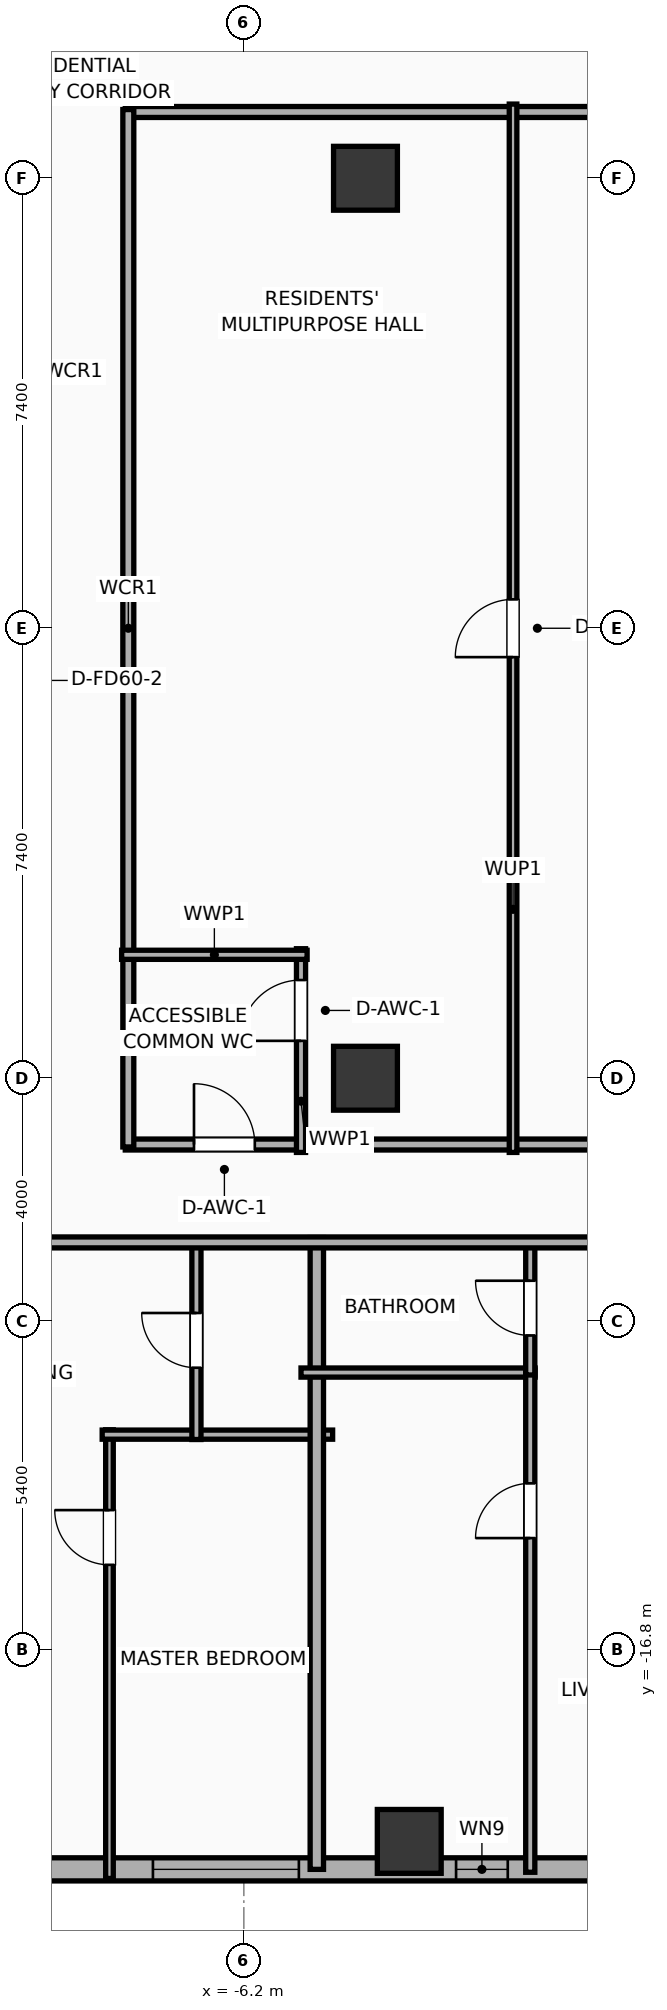
"""IFC4 building model, lengths in metres.
Left out: names, types, materials, properties, quantities, classifications, styles, units other than length and angle.
Written with IfcOpenShell. Run it as: python <this file> out.ifc"""

import sys

from ifc_helpers import new_model, si_unit, direction, frame, frame_2d, origin, origin_2d, place, context, subcontext, project, spatial, rectangle, hollow_rectangle, extrude, element, fill, save


model = new_model("IFC4")
c1 = context("Model", 3, precision=1e-05, world=origin(), true_north=direction((0.0, 1.0)))
c2 = subcontext(c1, "Body", "Model", "MODEL_VIEW")
j1 = project(units=[si_unit("LENGTHUNIT", "METRE"), si_unit("PLANEANGLEUNIT", "RADIAN")], contexts=[c1])
p1 = place(None, origin())
s1 = spatial("IfcSite", under=j1, at=p1, CompositionType="ELEMENT")
p2 = place(p1, origin())
s2 = spatial("IfcBuilding", under=s1, at=p2, CompositionType="ELEMENT")
p3 = place(p2, frame((0.0, 0.0, 105.3)))
s3 = spatial("IfcBuildingStorey", under=s2, at=p3, CompositionType="ELEMENT", Elevation=105.3)
for number, where, z_axis, x_axis in (
    (1, (-4.2, -7.4, 0.0), (0.0, 0.0, 1.0), (1.0, 0.0, 0.0)),
    (2, (-4.2, 7.4, 0.0), (0.0, 0.0, 1.0), (1.0, 0.0, 0.0)),
):
    element("IfcColumn", number, at=place(p3, frame(where, z_axis=z_axis, x_axis=x_axis)), inside=s3, PredefinedType="COLUMN", context=c2, shape_type="SweptSolid", body=[
        extrude(rectangle(XDim=1.05, YDim=1.05, at=origin_2d()), origin(), (0.0, 0.0, 1.0), 3.9),
    ])
p4 = place(p3, frame((-3.48, -19.95, 0.0), z_axis=(0.0, 0.0, 1.0), x_axis=(1.0, 0.0, 0.0)))
e3 = element("IfcColumn", 3, at=p4, inside=s3, PredefinedType="COLUMN", context=c2, shape_type="SweptSolid", body=[
    extrude(hollow_rectangle(XDim=1.05, YDim=1.05, WallThickness=0.036, at=origin_2d()), origin(), (0.0, 0.0, 1.0), 3.9),
])
p5 = place(p3, frame((29.381, -20.41, 0.0), z_axis=(0.0, 0.0, 1.0), x_axis=(-1.0, 0.0, 0.0)))
e4 = element("IfcWall", 4, at=p5, inside=s3, PredefinedType="ELEMENTEDWALL", context=c2, shape_type="SweptSolid", body=[
    extrude(rectangle(XDim=54.763, YDim=0.38, at=frame_2d((27.381, 0.0))), origin(), (0.0, 0.0, 1.0), 3.65),
])
p6 = place(p5, frame((6.495, 0.0, 0.75)))
e5 = element("IfcOpeningElement", 5, at=p6, cuts=e4, PredefinedType="OPENING", context=c2, shape_type="SweptSolid", body=[
    extrude(rectangle(XDim=2.4, YDim=2.1, at=frame_2d((1.2, 1.05))), frame((0.0, 0.2, 0.0), z_axis=(0.0, -1.0, 0.0), x_axis=(1.0, 0.0, 0.0)), (0.0, 0.0, 1.0), 0.4),
])
p7 = place(p5, frame((17.686, 0.0, 0.75)))
e6 = element("IfcOpeningElement", 6, at=p7, cuts=e4, PredefinedType="OPENING", context=c2, shape_type="SweptSolid", body=[
    extrude(rectangle(XDim=2.4, YDim=2.1, at=frame_2d((1.2, 1.05))), frame((0.0, 0.2, 0.0), z_axis=(0.0, -1.0, 0.0), x_axis=(1.0, 0.0, 0.0)), (0.0, 0.0, 1.0), 0.4),
])
p8 = place(p5, frame((34.677, 0.0, 0.75)))
e7 = element("IfcOpeningElement", 7, at=p8, cuts=e4, PredefinedType="OPENING", context=c2, shape_type="SweptSolid", body=[
    extrude(rectangle(XDim=2.4, YDim=2.1, at=frame_2d((1.2, 1.05))), frame((0.0, 0.2, 0.0), z_axis=(0.0, -1.0, 0.0), x_axis=(1.0, 0.0, 0.0)), (0.0, 0.0, 1.0), 0.4),
])
p9 = place(p5, frame((45.867, 0.0, 0.75)))
e8 = element("IfcOpeningElement", 8, at=p9, cuts=e4, PredefinedType="OPENING", context=c2, shape_type="SweptSolid", body=[
    extrude(rectangle(XDim=2.4, YDim=2.1, at=frame_2d((1.2, 1.05))), frame((0.0, 0.2, 0.0), z_axis=(0.0, -1.0, 0.0), x_axis=(1.0, 0.0, 0.0)), (0.0, 0.0, 1.0), 0.4),
])
p10 = place(p5, frame((52.281, 0.0, 0.75)))
e9 = element("IfcOpeningElement", 9, at=p10, cuts=e4, PredefinedType="OPENING", context=c2, shape_type="SweptSolid", body=[
    extrude(rectangle(XDim=1.2, YDim=2.05, at=frame_2d((0.6, 1.025))), frame((0.0, 0.2, 0.0), z_axis=(0.0, -1.0, 0.0), x_axis=(1.0, 0.0, 0.0)), (0.0, 0.0, 1.0), 0.4),
])
p11 = place(p5, frame((49.641, 0.0, 0.75)))
e10 = element("IfcOpeningElement", 10, at=p11, cuts=e4, PredefinedType="OPENING", context=c2, shape_type="SweptSolid", body=[
    extrude(rectangle(XDim=1.2, YDim=2.05, at=frame_2d((0.6, 1.025))), frame((0.0, 0.2, 0.0), z_axis=(0.0, -1.0, 0.0), x_axis=(1.0, 0.0, 0.0)), (0.0, 0.0, 1.0), 0.4),
])
p12 = place(p5, frame((39.543, 0.0, 0.75)))
e11 = element("IfcOpeningElement", 11, at=p12, cuts=e4, PredefinedType="OPENING", context=c2, shape_type="SweptSolid", body=[
    extrude(rectangle(XDim=1.2, YDim=2.05, at=frame_2d((0.6, 1.025))), frame((0.0, 0.2, 0.0), z_axis=(0.0, -1.0, 0.0), x_axis=(1.0, 0.0, 0.0)), (0.0, 0.0, 1.0), 0.4),
])
p13 = place(p5, frame((44.538, 0.0, 0.75)))
e12 = element("IfcOpeningElement", 12, at=p13, cuts=e4, PredefinedType="OPENING", context=c2, shape_type="SweptSolid", body=[
    extrude(rectangle(XDim=0.52, YDim=2.05, at=frame_2d((0.26, 1.025))), frame((0.0, 0.2, 0.0), z_axis=(0.0, -1.0, 0.0), x_axis=(1.0, 0.0, 0.0)), (0.0, 0.0, 1.0), 0.4),
])
p14 = place(p5, frame((28.206, 0.0, 0.75)))
e13 = element("IfcOpeningElement", 13, at=p14, cuts=e4, PredefinedType="OPENING", context=c2, shape_type="SweptSolid", body=[
    extrude(rectangle(XDim=1.2, YDim=2.05, at=frame_2d((0.6, 1.025))), frame((0.0, 0.2, 0.0), z_axis=(0.0, -1.0, 0.0), x_axis=(1.0, 0.0, 0.0)), (0.0, 0.0, 1.0), 0.4),
])
p15 = place(p5, frame((31.241, 0.0, 0.75)))
e14 = element("IfcOpeningElement", 14, at=p15, cuts=e4, PredefinedType="OPENING", context=c2, shape_type="SweptSolid", body=[
    extrude(rectangle(XDim=0.85, YDim=2.05, at=frame_2d((0.425, 1.025))), frame((0.0, 0.2, 0.0), z_axis=(0.0, -1.0, 0.0), x_axis=(1.0, 0.0, 0.0)), (0.0, 0.0, 1.0), 0.4),
])
p16 = place(p5, frame((24.561, 0.0, 0.75)))
e15 = element("IfcOpeningElement", 15, at=p16, cuts=e4, PredefinedType="OPENING", context=c2, shape_type="SweptSolid", body=[
    extrude(rectangle(XDim=1.2, YDim=2.05, at=frame_2d((0.6, 1.025))), frame((0.0, 0.2, 0.0), z_axis=(0.0, -1.0, 0.0), x_axis=(1.0, 0.0, 0.0)), (0.0, 0.0, 1.0), 0.4),
])
p17 = place(p5, frame((22.561, 0.0, 0.75)))
e16 = element("IfcOpeningElement", 16, at=p17, cuts=e4, PredefinedType="OPENING", context=c2, shape_type="SweptSolid", body=[
    extrude(rectangle(XDim=0.52, YDim=2.05, at=frame_2d((0.26, 1.025))), frame((0.0, 0.2, 0.0), z_axis=(0.0, -1.0, 0.0), x_axis=(1.0, 0.0, 0.0)), (0.0, 0.0, 1.0), 0.4),
])
p18 = place(p5, frame((13.886, 0.0, 0.75)))
e17 = element("IfcOpeningElement", 17, at=p18, cuts=e4, PredefinedType="OPENING", context=c2, shape_type="SweptSolid", body=[
    extrude(rectangle(XDim=1.2, YDim=2.05, at=frame_2d((0.6, 1.025))), frame((0.0, 0.2, 0.0), z_axis=(0.0, -1.0, 0.0), x_axis=(1.0, 0.0, 0.0)), (0.0, 0.0, 1.0), 0.4),
])
p19 = place(p5, frame((11.694, 0.0, 0.75)))
e18 = element("IfcOpeningElement", 18, at=p19, cuts=e4, PredefinedType="OPENING", context=c2, shape_type="SweptSolid", body=[
    extrude(rectangle(XDim=0.85, YDim=2.05, at=frame_2d((0.425, 1.025))), frame((0.0, 0.2, 0.0), z_axis=(0.0, -1.0, 0.0), x_axis=(1.0, 0.0, 0.0)), (0.0, 0.0, 1.0), 0.4),
])
p20 = place(p5, frame((3.286, 0.0, 0.75)))
e19 = element("IfcOpeningElement", 19, at=p20, cuts=e4, PredefinedType="OPENING", context=c2, shape_type="SweptSolid", body=[
    extrude(rectangle(XDim=1.2, YDim=2.05, at=frame_2d((0.6, 1.025))), frame((0.0, 0.2, 0.0), z_axis=(0.0, -1.0, 0.0), x_axis=(1.0, 0.0, 0.0)), (0.0, 0.0, 1.0), 0.4),
])
p21 = place(p5, frame((0.816, 0.0, 0.75)))
e20 = element("IfcOpeningElement", 20, at=p21, cuts=e4, PredefinedType="OPENING", context=c2, shape_type="SweptSolid", body=[
    extrude(rectangle(XDim=1.2, YDim=2.05, at=frame_2d((0.6, 1.025))), frame((0.0, 0.2, 0.0), z_axis=(0.0, -1.0, 0.0), x_axis=(1.0, 0.0, 0.0)), (0.0, 0.0, 1.0), 0.4),
])
p22 = place(p3, frame((-8.15, 8.49, 0.0), z_axis=(0.0, 0.0, 1.0), x_axis=(1.0, 0.0, 0.0)))
e21 = element("IfcWall", 21, at=p22, inside=s3, PredefinedType="PARTITIONING", context=c2, shape_type="SweptSolid", body=[
    extrude(rectangle(XDim=16.3, YDim=0.18, at=frame_2d((8.15, 0.0))), origin(), (0.0, 0.0, 1.0), 3.65),
])
p23 = place(p22, frame((8.49, 0.0, 0.0)))
e22 = element("IfcOpeningElement", 22, at=p23, cuts=e21, PredefinedType="OPENING", context=c2, shape_type="SweptSolid", body=[
    extrude(rectangle(XDim=0.95, YDim=2.05, at=frame_2d((0.475, 1.025))), frame((0.0, 0.1, 0.0), z_axis=(0.0, -1.0, 0.0), x_axis=(1.0, 0.0, 0.0)), (0.0, 0.0, 1.0), 0.2),
])
p24 = place(p3, frame((-8.15, -8.49, 0.0), z_axis=(0.0, 0.0, 1.0), x_axis=(1.0, 0.0, 0.0)))
e23 = element("IfcWall", 23, at=p24, inside=s3, PredefinedType="PARTITIONING", context=c2, shape_type="SweptSolid", body=[
    extrude(rectangle(XDim=16.3, YDim=0.18, at=frame_2d((8.15, 0.0))), origin(), (0.0, 0.0, 1.0), 3.65),
])
p25 = place(p24, frame((1.13, 0.0, 0.0)))
e24 = element("IfcOpeningElement", 24, at=p25, cuts=e23, PredefinedType="OPENING", context=c2, shape_type="SweptSolid", body=[
    extrude(rectangle(XDim=1.0, YDim=2.05, at=frame_2d((0.5, 1.025))), frame((0.0, 0.1, 0.0), z_axis=(0.0, -1.0, 0.0), x_axis=(1.0, 0.0, 0.0)), (0.0, 0.0, 1.0), 0.2),
])
p26 = place(p24, frame((10.12, 0.0, 0.0)))
e25 = element("IfcOpeningElement", 25, at=p26, cuts=e23, PredefinedType="OPENING", context=c2, shape_type="SweptSolid", body=[
    extrude(rectangle(XDim=0.95, YDim=2.05, at=frame_2d((0.475, 1.025))), frame((0.0, 0.1, 0.0), z_axis=(0.0, -1.0, 0.0), x_axis=(1.0, 0.0, 0.0)), (0.0, 0.0, 1.0), 0.2),
])
p27 = place(p3, frame((-8.1, -8.53, 0.0), z_axis=(0.0, 0.0, 1.0), x_axis=(0.0, 1.0, 0.0)))
e26 = element("IfcWall", 26, at=p27, inside=s3, PredefinedType="PARTITIONING", context=c2, shape_type="SweptSolid", body=[
    extrude(rectangle(XDim=17.06, YDim=0.18, at=frame_2d((8.53, 0.0))), origin(), (0.0, 0.0, 1.0), 3.65),
])
p28 = place(p3, frame((-5.26, -8.62, 0.0), z_axis=(0.0, 0.0, 1.0), x_axis=(0.0, 1.0, 0.0)))
e27 = element("IfcWall", 27, at=p28, inside=s3, PredefinedType="PLUMBINGWALL", context=c2, shape_type="SweptSolid", body=[
    extrude(rectangle(XDim=3.35, YDim=0.15, at=frame_2d((1.675, 0.0))), origin(), (0.0, 0.0, 1.0), 3.65),
])
p29 = place(p28, frame((1.835, 0.0, 0.0)))
e28 = element("IfcOpeningElement", 28, at=p29, cuts=e27, PredefinedType="OPENING", context=c2, shape_type="SweptSolid", body=[
    extrude(rectangle(XDim=1.0, YDim=2.05, at=frame_2d((0.5, 1.025))), frame((0.0, 0.085, 0.0), z_axis=(0.0, -1.0, 0.0), x_axis=(1.0, 0.0, 0.0)), (0.0, 0.0, 1.0), 0.17),
])
p30 = place(p3, frame((-8.21, -5.37, 0.0), z_axis=(0.0, 0.0, 1.0), x_axis=(1.0, 0.0, 0.0)))
e29 = element("IfcWall", 29, at=p30, inside=s3, PredefinedType="PLUMBINGWALL", context=c2, shape_type="SweptSolid", body=[
    extrude(rectangle(XDim=3.05, YDim=0.15, at=frame_2d((1.525, 0.0))), origin(), (0.0, 0.0, 1.0), 3.65),
])
p31 = place(p3, frame((-1.773, -8.62, 0.0), z_axis=(0.0, 0.0, 1.0), x_axis=(0.0, 1.0, 0.0)))
e30 = element("IfcWall", 30, at=p31, inside=s3, PredefinedType="PARTITIONING", context=c2, shape_type="SweptSolid", body=[
    extrude(rectangle(XDim=17.24, YDim=0.125, at=frame_2d((8.62, 0.0))), origin(), (0.0, 0.0, 1.0), 3.65),
])
p32 = place(p31, frame((8.145, 0.0, 0.0)))
e31 = element("IfcOpeningElement", 31, at=p32, cuts=e30, PredefinedType="OPENING", context=c2, shape_type="SweptSolid", body=[
    extrude(rectangle(XDim=0.95, YDim=2.05, at=frame_2d((0.475, 1.025))), frame((0.0, 0.073, 0.0), z_axis=(0.0, -1.0, 0.0), x_axis=(1.0, 0.0, 0.0)), (0.0, 0.0, 1.0), 0.145),
])
p33 = place(p3, frame((-8.41, -20.56, 0.0), z_axis=(0.0, 0.0, 1.0), x_axis=(0.0, 1.0, 0.0)))
e32 = element("IfcWall", 32, at=p33, inside=s3, PredefinedType="PARTITIONING", context=c2, shape_type="SweptSolid", body=[
    extrude(rectangle(XDim=7.379, YDim=0.125, at=frame_2d((3.689, 0.0))), origin(), (0.0, 0.0, 1.0), 3.65),
])
p34 = place(p33, frame((5.158, 0.0, 0.0)))
e33 = element("IfcOpeningElement", 33, at=p34, cuts=e32, PredefinedType="OPENING", context=c2, shape_type="SweptSolid", body=[
    extrude(rectangle(XDim=0.9, YDim=2.05, at=frame_2d((0.45, 1.025))), frame((0.0, 0.073, 0.0), z_axis=(0.0, -1.0, 0.0), x_axis=(1.0, 0.0, 0.0)), (0.0, 0.0, 1.0), 0.145),
])
p35 = place(p3, frame((-8.53, -13.261, 0.0), z_axis=(0.0, 0.0, 1.0), x_axis=(1.0, 0.0, 0.0)))
e34 = element("IfcWall", 34, at=p35, inside=s3, PredefinedType="PLUMBINGWALL", context=c2, shape_type="SweptSolid", body=[
    extrude(rectangle(XDim=3.79, YDim=0.15, at=frame_2d((1.895, 0.0))), origin(), (0.0, 0.0, 1.0), 3.65),
])
p36 = place(p3, frame((-6.98, -13.341, 0.0), z_axis=(0.0, 0.0, 1.0), x_axis=(0.0, 1.0, 0.0)))
e35 = element("IfcWall", 35, at=p36, inside=s3, PredefinedType="PLUMBINGWALL", context=c2, shape_type="SweptSolid", body=[
    extrude(rectangle(XDim=3.261, YDim=0.15, at=frame_2d((1.63, 0.0))), origin(), (0.0, 0.0, 1.0), 3.65),
])
p37 = place(p36, frame((1.18, 0.0, 0.0)))
e36 = element("IfcOpeningElement", 36, at=p37, cuts=e35, PredefinedType="OPENING", context=c2, shape_type="SweptSolid", body=[
    extrude(rectangle(XDim=0.9, YDim=2.05, at=frame_2d((0.45, 1.025))), frame((0.0, 0.085, 0.0), z_axis=(0.0, -1.0, 0.0), x_axis=(1.0, 0.0, 0.0)), (0.0, 0.0, 1.0), 0.17),
])
p38 = place(p3, frame((-5.0, -20.41, 0.0), z_axis=(0.0, 0.0, 1.0), x_axis=(0.0, 1.0, 0.0)))
e37 = element("IfcWall", 37, at=p38, inside=s3, PredefinedType="PARTITIONING", context=c2, shape_type="SweptSolid", body=[
    extrude(rectangle(XDim=10.39, YDim=0.22, at=frame_2d((5.195, 0.0))), origin(), (0.0, 0.0, 1.0), 3.65),
])
p39 = place(p3, frame((-5.26, -12.24, 0.0), z_axis=(0.0, 0.0, 1.0), x_axis=(1.0, 0.0, 0.0)))
e38 = element("IfcWall", 38, at=p39, inside=s3, PredefinedType="PLUMBINGWALL", context=c2, shape_type="SweptSolid", body=[
    extrude(rectangle(XDim=3.85, YDim=0.15, at=frame_2d((1.925, 0.0))), origin(), (0.0, 0.0, 1.0), 3.65),
])
p40 = place(p3, frame((-1.49, -20.458, 0.0), z_axis=(0.0, 0.0, 1.0), x_axis=(0.0, 1.0, 0.0)))
e39 = element("IfcWall", 39, at=p40, inside=s3, PredefinedType="PLUMBINGWALL", context=c2, shape_type="SweptSolid", body=[
    extrude(rectangle(XDim=8.258, YDim=0.15, at=frame_2d((4.129, 0.0))), origin(), (0.0, 0.0, 1.0), 3.65),
])
p41 = place(p40, frame((5.496, 0.0, 0.0)))
e40 = element("IfcOpeningElement", 40, at=p41, cuts=e39, PredefinedType="OPENING", context=c2, shape_type="SweptSolid", body=[
    extrude(rectangle(XDim=0.9, YDim=2.05, at=frame_2d((0.45, 1.025))), frame((0.0, 0.085, 0.0), z_axis=(0.0, -1.0, 0.0), x_axis=(1.0, 0.0, 0.0)), (0.0, 0.0, 1.0), 0.17),
])
p42 = place(p3, frame((-1.49, -12.28, 0.0), z_axis=(0.0, 0.0, 1.0), x_axis=(0.0, 1.0, 0.0)))
e41 = element("IfcWall", 41, at=p42, inside=s3, PredefinedType="PLUMBINGWALL", context=c2, shape_type="SweptSolid", body=[
    extrude(rectangle(XDim=2.2, YDim=0.15, at=frame_2d((1.1, 0.0))), origin(), (0.0, 0.0, 1.0), 3.65),
])
p43 = place(p42, frame((0.65, 0.0, 0.0)))
e42 = element("IfcOpeningElement", 42, at=p43, cuts=e41, PredefinedType="OPENING", context=c2, shape_type="SweptSolid", body=[
    extrude(rectangle(XDim=0.9, YDim=2.05, at=frame_2d((0.45, 1.025))), frame((0.0, 0.085, 0.0), z_axis=(0.0, -1.0, 0.0), x_axis=(1.0, 0.0, 0.0)), (0.0, 0.0, 1.0), 0.17),
])
p44 = place(p3, frame((-29.21, -10.1, 0.0), z_axis=(0.0, 0.0, 1.0), x_axis=(1.0, 0.0, 0.0)))
e43 = element("IfcWall", 43, at=p44, inside=s3, PredefinedType="PARTITIONING", context=c2, shape_type="SweptSolid", body=[
    extrude(rectangle(XDim=62.42, YDim=0.18, at=frame_2d((31.21, 0.0))), origin(), (0.0, 0.0, 1.0), 3.65),
])
p45 = place(p44, frame((3.033, 0.0, 0.0)))
e44 = element("IfcOpeningElement", 44, at=p45, cuts=e43, PredefinedType="OPENING", context=c2, shape_type="SweptSolid", body=[
    extrude(rectangle(XDim=0.9, YDim=2.05, at=frame_2d((0.45, 1.025))), frame((0.0, 0.1, 0.0), z_axis=(0.0, -1.0, 0.0), x_axis=(1.0, 0.0, 0.0)), (0.0, 0.0, 1.0), 0.2),
])
p46 = place(p44, frame((9.768, 0.0, 0.0)))
e45 = element("IfcOpeningElement", 45, at=p46, cuts=e43, PredefinedType="OPENING", context=c2, shape_type="SweptSolid", body=[
    extrude(rectangle(XDim=0.9, YDim=2.05, at=frame_2d((0.45, 1.025))), frame((0.0, 0.1, 0.0), z_axis=(0.0, -1.0, 0.0), x_axis=(1.0, 0.0, 0.0)), (0.0, 0.0, 1.0), 0.2),
])
p47 = place(p44, frame((18.65, 0.0, 0.0)))
e46 = element("IfcOpeningElement", 46, at=p47, cuts=e43, PredefinedType="OPENING", context=c2, shape_type="SweptSolid", body=[
    extrude(rectangle(XDim=1.15, YDim=2.05, at=frame_2d((0.575, 1.025))), frame((0.0, 0.1, 0.0), z_axis=(0.0, -1.0, 0.0), x_axis=(1.0, 0.0, 0.0)), (0.0, 0.0, 1.0), 0.2),
])
p48 = place(p44, frame((29.212, 0.0, 0.0)))
e47 = element("IfcOpeningElement", 47, at=p48, cuts=e43, PredefinedType="OPENING", context=c2, shape_type="SweptSolid", body=[
    extrude(rectangle(XDim=1.15, YDim=2.05, at=frame_2d((0.575, 1.025))), frame((0.0, 0.1, 0.0), z_axis=(0.0, -1.0, 0.0), x_axis=(1.0, 0.0, 0.0)), (0.0, 0.0, 1.0), 0.2),
])
p49 = place(p44, frame((40.379, 0.0, 0.0)))
e48 = element("IfcOpeningElement", 48, at=p49, cuts=e43, PredefinedType="OPENING", context=c2, shape_type="SweptSolid", body=[
    extrude(rectangle(XDim=1.15, YDim=2.05, at=frame_2d((0.575, 1.025))), frame((0.0, 0.1, 0.0), z_axis=(0.0, -1.0, 0.0), x_axis=(1.0, 0.0, 0.0)), (0.0, 0.0, 1.0), 0.2),
])
p50 = place(p44, frame((50.959, 0.0, 0.0)))
e49 = element("IfcOpeningElement", 49, at=p50, cuts=e43, PredefinedType="OPENING", context=c2, shape_type="SweptSolid", body=[
    extrude(rectangle(XDim=1.15, YDim=2.05, at=frame_2d((0.575, 1.025))), frame((0.0, 0.1, 0.0), z_axis=(0.0, -1.0, 0.0), x_axis=(1.0, 0.0, 0.0)), (0.0, 0.0, 1.0), 0.2),
])
p51 = place(p44, frame((59.117, 0.0, 0.0)))
e50 = element("IfcOpeningElement", 50, at=p51, cuts=e43, PredefinedType="OPENING", context=c2, shape_type="SweptSolid", body=[
    extrude(rectangle(XDim=0.9, YDim=2.05, at=frame_2d((0.45, 1.025))), frame((0.0, 0.1, 0.0), z_axis=(0.0, -1.0, 0.0), x_axis=(1.0, 0.0, 0.0)), (0.0, 0.0, 1.0), 0.2),
])
p52 = place(p8, origin())
e51 = element("IfcWindow", 51, at=p52, inside=s3, PartitioningType="SINGLE_PANEL", PredefinedType="WINDOW", context=c2, shape_type="SweptSolid", body=[
    extrude(rectangle(XDim=2.4, YDim=2.1, at=frame_2d((1.2, 1.05))), frame((0.0, 0.03, 0.0), z_axis=(0.0, -1.0, 0.0), x_axis=(1.0, 0.0, 0.0)), (0.0, 0.0, 1.0), 0.06),
])
fill(e7, e51)
p53 = place(p15, origin())
e52 = element("IfcWindow", 52, at=p53, inside=s3, PartitioningType="SINGLE_PANEL", PredefinedType="WINDOW", context=c2, shape_type="SweptSolid", body=[
    extrude(rectangle(XDim=0.85, YDim=2.05, at=frame_2d((0.425, 1.025))), frame((0.0, 0.03, 0.0), z_axis=(0.0, -1.0, 0.0), x_axis=(1.0, 0.0, 0.0)), (0.0, 0.0, 1.0), 0.06),
])
fill(e14, e52)
p54 = place(p25, origin())
e53 = element("IfcDoor", 53, at=p54, inside=s3, OperationType="SINGLE_SWING_LEFT", PredefinedType="DOOR", context=c2, shape_type="SweptSolid", body=[
    extrude(rectangle(XDim=1.0, YDim=2.05, at=frame_2d((0.5, 1.025))), frame((0.0, 0.025, 0.0), z_axis=(0.0, -1.0, 0.0), x_axis=(1.0, 0.0, 0.0)), (0.0, 0.0, 1.0), 0.05),
])
fill(e24, e53)
p55 = place(p29, origin())
e54 = element("IfcDoor", 54, at=p55, inside=s3, OperationType="SINGLE_SWING_LEFT", PredefinedType="DOOR", context=c2, shape_type="SweptSolid", body=[
    extrude(rectangle(XDim=1.0, YDim=2.05, at=frame_2d((0.5, 1.025))), frame((0.0, 0.025, 0.0), z_axis=(0.0, -1.0, 0.0), x_axis=(1.0, 0.0, 0.0)), (0.0, 0.0, 1.0), 0.05),
])
fill(e28, e54)
p56 = place(p32, origin())
e55 = element("IfcDoor", 55, at=p56, inside=s3, OperationType="SINGLE_SWING_LEFT", PredefinedType="DOOR", context=c2, shape_type="SweptSolid", body=[
    extrude(rectangle(XDim=0.95, YDim=2.05, at=frame_2d((0.475, 1.025))), frame((0.0, 0.025, 0.0), z_axis=(0.0, -1.0, 0.0), x_axis=(1.0, 0.0, 0.0)), (0.0, 0.0, 1.0), 0.05),
])
fill(e31, e55)
p57 = place(p34, origin())
e56 = element("IfcDoor", 56, at=p57, inside=s3, OperationType="SINGLE_SWING_RIGHT", PredefinedType="DOOR", context=c2, shape_type="SweptSolid", body=[
    extrude(rectangle(XDim=0.9, YDim=2.05, at=frame_2d((0.45, 1.025))), frame((0.0, 0.025, 0.0), z_axis=(0.0, -1.0, 0.0), x_axis=(1.0, 0.0, 0.0)), (0.0, 0.0, 1.0), 0.05),
])
fill(e33, e56)
p58 = place(p37, origin())
e57 = element("IfcDoor", 57, at=p58, inside=s3, OperationType="SINGLE_SWING_RIGHT", PredefinedType="DOOR", context=c2, shape_type="SweptSolid", body=[
    extrude(rectangle(XDim=0.9, YDim=2.05, at=frame_2d((0.45, 1.025))), frame((0.0, 0.025, 0.0), z_axis=(0.0, -1.0, 0.0), x_axis=(1.0, 0.0, 0.0)), (0.0, 0.0, 1.0), 0.05),
])
fill(e36, e57)
p59 = place(p41, origin())
e58 = element("IfcDoor", 58, at=p59, inside=s3, OperationType="SINGLE_SWING_LEFT", PredefinedType="DOOR", context=c2, shape_type="SweptSolid", body=[
    extrude(rectangle(XDim=0.9, YDim=2.05, at=frame_2d((0.45, 1.025))), frame((0.0, 0.025, 0.0), z_axis=(0.0, -1.0, 0.0), x_axis=(1.0, 0.0, 0.0)), (0.0, 0.0, 1.0), 0.05),
])
fill(e40, e58)
p60 = place(p43, origin())
e59 = element("IfcDoor", 59, at=p60, inside=s3, OperationType="SINGLE_SWING_RIGHT", PredefinedType="DOOR", context=c2, shape_type="SweptSolid", body=[
    extrude(rectangle(XDim=0.9, YDim=2.05, at=frame_2d((0.45, 1.025))), frame((0.0, 0.025, 0.0), z_axis=(0.0, -1.0, 0.0), x_axis=(1.0, 0.0, 0.0)), (0.0, 0.0, 1.0), 0.05),
])
fill(e42, e59)
save(model, sys.argv[1])
